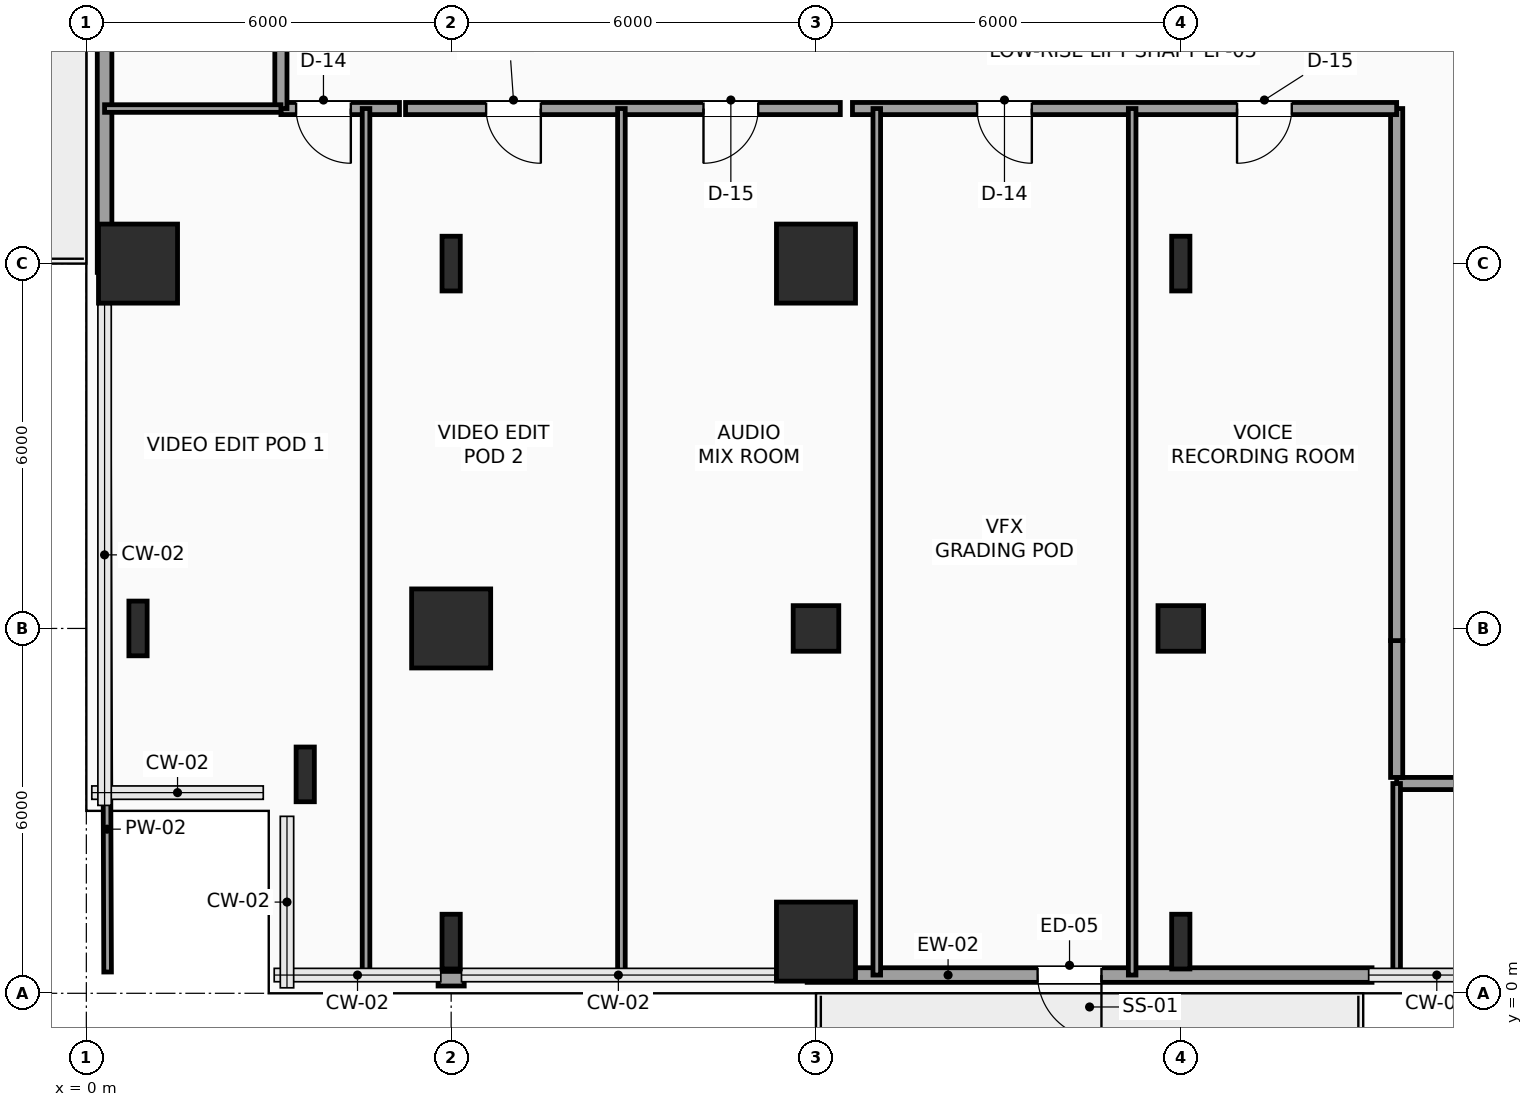
"""IFC4 building model, lengths in metres.
Left out: names, types, materials, properties, quantities, classifications, styles, units other than length and angle.
Written with IfcOpenShell. Run it as: python <this file> out.ifc"""

import sys

from ifc_helpers import new_model, si_unit, direction, frame, frame_2d, origin, origin_2d, place, context, subcontext, project, spatial, rectangle, hollow_rectangle, i_section, extrude, element, fill, save


model = new_model("IFC4")
c1 = context("Model", 3, precision=1e-05, world=origin(), true_north=direction((0.0, 1.0)))
c2 = subcontext(c1, "Body", "Model", "MODEL_VIEW")
j1 = project(units=[si_unit("LENGTHUNIT", "METRE"), si_unit("PLANEANGLEUNIT", "RADIAN")], contexts=[c1])
p1 = place(None, origin())
s1 = spatial("IfcSite", under=j1, at=p1, CompositionType="ELEMENT")
p2 = place(p1, origin())
s2 = spatial("IfcBuilding", under=s1, at=p2, CompositionType="ELEMENT")
p3 = place(p2, frame((0.0, 0.0, 51.9)))
s3 = spatial("IfcBuildingStorey", under=s2, at=p3, CompositionType="ELEMENT", Elevation=51.9)
for number, where, z_axis, x_axis in (
    (1, (3.6, 3.6, 0.0), (0.0, 0.0, 1.0), (1.0, 0.0, 0.0)),
    (2, (0.85, 6.0, 0.0), (0.0, 0.0, 1.0), (1.0, 0.0, 0.0)),
):
    element("IfcColumn", number, at=place(p3, frame(where, z_axis=z_axis, x_axis=x_axis)), inside=s3, PredefinedType="COLUMN", context=c2, shape_type="SweptSolid", body=[
        extrude(i_section(OverallWidth=0.3, OverallDepth=0.9, WebThickness=0.019, FlangeThickness=0.035, FilletRadius=0.03, at=origin_2d()), origin(), (0.0, 0.0, 1.0), 3.9),
    ])
p4 = place(p3, frame((0.85, 12.0, 0.0), z_axis=(0.0, 0.0, 1.0), x_axis=(1.0, 0.0, 0.0)))
e3 = element("IfcColumn", 3, at=p4, inside=s3, PredefinedType="COLUMN", context=c2, shape_type="SweptSolid", body=[
    extrude(rectangle(XDim=1.3, YDim=1.3, at=origin_2d()), origin(), (0.0, 0.0, 1.0), 3.9),
])
p5 = place(p3, frame((6.0, 0.85, 0.0), z_axis=(0.0, 0.0, 1.0), x_axis=(1.0, 0.0, 0.0)))
e4 = element("IfcColumn", 4, at=p5, inside=s3, PredefinedType="COLUMN", context=c2, shape_type="SweptSolid", body=[
    extrude(i_section(OverallWidth=0.3, OverallDepth=0.9, WebThickness=0.019, FlangeThickness=0.035, FilletRadius=0.03, at=origin_2d()), origin(), (0.0, 0.0, 1.0), 3.9),
])
p6 = place(p3, frame((6.0, 6.0, 0.0), z_axis=(0.0, 0.0, 1.0), x_axis=(1.0, 0.0, 0.0)))
e5 = element("IfcColumn", 5, at=p6, inside=s3, PredefinedType="COLUMN", context=c2, shape_type="SweptSolid", body=[
    extrude(rectangle(XDim=1.3, YDim=1.3, at=origin_2d()), origin(), (0.0, 0.0, 1.0), 3.9),
])
p7 = place(p3, frame((6.0, 12.0, 0.0), z_axis=(0.0, 0.0, 1.0), x_axis=(1.0, 0.0, 0.0)))
e6 = element("IfcColumn", 6, at=p7, inside=s3, PredefinedType="COLUMN", context=c2, shape_type="SweptSolid", body=[
    extrude(i_section(OverallWidth=0.3, OverallDepth=0.9, WebThickness=0.019, FlangeThickness=0.035, FilletRadius=0.03, at=origin_2d()), origin(), (0.0, 0.0, 1.0), 3.9),
])
p8 = place(p3, frame((12.0, 0.85, 0.0), z_axis=(0.0, 0.0, 1.0), x_axis=(1.0, 0.0, 0.0)))
e7 = element("IfcColumn", 7, at=p8, inside=s3, PredefinedType="COLUMN", context=c2, shape_type="SweptSolid", body=[
    extrude(rectangle(XDim=1.3, YDim=1.3, at=origin_2d()), origin(), (0.0, 0.0, 1.0), 3.9),
])
p9 = place(p3, frame((12.0, 6.0, 0.0), z_axis=(0.0, 0.0, 1.0), x_axis=(1.0, 0.0, 0.0)))
e8 = element("IfcColumn", 8, at=p9, inside=s3, PredefinedType="COLUMN", context=c2, shape_type="SweptSolid", body=[
    extrude(hollow_rectangle(XDim=0.75, YDim=0.75, WallThickness=0.035, InnerFilletRadius=0.035, OuterFilletRadius=0.05, at=origin_2d()), origin(), (0.0, 0.0, 1.0), 3.9),
])
p10 = place(p3, frame((12.0, 12.0, 0.0), z_axis=(0.0, 0.0, 1.0), x_axis=(1.0, 0.0, 0.0)))
e9 = element("IfcColumn", 9, at=p10, inside=s3, PredefinedType="COLUMN", context=c2, shape_type="SweptSolid", body=[
    extrude(rectangle(XDim=1.3, YDim=1.3, at=origin_2d()), origin(), (0.0, 0.0, 1.0), 3.9),
])
p11 = place(p3, frame((18.0, 0.85, 0.0), z_axis=(0.0, 0.0, 1.0), x_axis=(1.0, 0.0, 0.0)))
e10 = element("IfcColumn", 10, at=p11, inside=s3, PredefinedType="COLUMN", context=c2, shape_type="SweptSolid", body=[
    extrude(i_section(OverallWidth=0.3, OverallDepth=0.9, WebThickness=0.019, FlangeThickness=0.035, FilletRadius=0.03, at=origin_2d()), origin(), (0.0, 0.0, 1.0), 3.9),
])
p12 = place(p3, frame((18.0, 6.0, 0.0), z_axis=(0.0, 0.0, 1.0), x_axis=(1.0, 0.0, 0.0)))
e11 = element("IfcColumn", 11, at=p12, inside=s3, PredefinedType="COLUMN", context=c2, shape_type="SweptSolid", body=[
    extrude(hollow_rectangle(XDim=0.75, YDim=0.75, WallThickness=0.035, InnerFilletRadius=0.035, OuterFilletRadius=0.05, at=origin_2d()), origin(), (0.0, 0.0, 1.0), 3.9),
])
p13 = place(p3, frame((18.0, 12.0, 0.0), z_axis=(0.0, 0.0, 1.0), x_axis=(1.0, 0.0, 0.0)))
e12 = element("IfcColumn", 12, at=p13, inside=s3, PredefinedType="COLUMN", context=c2, shape_type="SweptSolid", body=[
    extrude(i_section(OverallWidth=0.3, OverallDepth=0.9, WebThickness=0.019, FlangeThickness=0.035, FilletRadius=0.03, at=origin_2d()), origin(), (0.0, 0.0, 1.0), 3.9),
])
p14 = place(p3, frame((21.145, 0.3, 0.0), z_axis=(0.0, 0.0, 1.0), x_axis=(-1.0, 0.0, 0.0)))
e13 = element("IfcWall", 13, at=p14, inside=s3, PredefinedType="SOLIDWALL", context=c2, shape_type="SweptSolid", body=[
    extrude(rectangle(XDim=9.29, YDim=0.24, at=frame_2d((4.645, 0.0))), origin(), (0.0, 0.0, 1.0), 3.65),
])
p15 = place(p14, frame((4.45, 0.0, 0.0)))
e14 = element("IfcOpeningElement", 14, at=p15, cuts=e13, PredefinedType="OPENING", context=c2, shape_type="SweptSolid", body=[
    extrude(rectangle(XDim=1.05, YDim=2.2, at=frame_2d((0.525, 1.1))), frame((0.0, 0.13, 0.0), z_axis=(0.0, -1.0, 0.0), x_axis=(1.0, 0.0, 0.0)), (0.0, 0.0, 1.0), 0.26),
])
p16 = place(p3, frame((0.3, 11.855, 0.0), z_axis=(0.0, 0.0, 1.0), x_axis=(0.0, 1.0, 0.0)))
e15 = element("IfcWall", 15, at=p16, inside=s3, PredefinedType="SOLIDWALL", context=c2, shape_type="SweptSolid", body=[
    extrude(rectangle(XDim=9.29, YDim=0.24, at=frame_2d((4.645, 0.0))), origin(), (0.0, 0.0, 1.0), 3.65),
])
p17 = place(p16, frame((3.945, 0.0, 0.0)))
e16 = element("IfcOpeningElement", 16, at=p17, cuts=e15, PredefinedType="OPENING", context=c2, shape_type="SweptSolid", body=[
    extrude(rectangle(XDim=1.05, YDim=2.2, at=frame_2d((0.525, 1.1))), frame((0.0, 0.13, 0.0), z_axis=(0.0, -1.0, 0.0), x_axis=(1.0, 0.0, 0.0)), (0.0, 0.0, 1.0), 0.26),
])
p18 = place(p3, frame((6.215, 0.24, 0.0), z_axis=(0.0, 0.0, 1.0), x_axis=(-1.0, 0.0, 0.0)))
e17 = element("IfcWall", 17, at=p18, inside=s3, PredefinedType="SOLIDWALL", context=c2, shape_type="SweptSolid", body=[
    extrude(rectangle(XDim=0.43, YDim=0.24, at=frame_2d((0.215, 0.0))), origin(), (0.0, 0.0, 1.0), 3.65),
])
p19 = place(p3, frame((36.15, 3.45, 0.0), z_axis=(0.0, 0.0, 1.0), x_axis=(-1.0, 0.0, 0.0)))
e18 = element("IfcWall", 18, at=p19, inside=s3, PredefinedType="PARTITIONING", context=c2, shape_type="SweptSolid", body=[
    extrude(rectangle(XDim=14.6, YDim=0.2, at=frame_2d((7.3, 0.0))), origin(), (0.0, 0.0, 1.0), 3.142),
])
p20 = place(p19, frame((11.325, 0.0, 0.0)))
e19 = element("IfcOpeningElement", 19, at=p20, cuts=e18, PredefinedType="OPENING", context=c2, shape_type="SweptSolid", body=[
    extrude(rectangle(XDim=0.9, YDim=2.1, at=frame_2d((0.45, 1.05))), frame((0.0, 0.11, 0.0), z_axis=(0.0, -1.0, 0.0), x_axis=(1.0, 0.0, 0.0)), (0.0, 0.0, 1.0), 0.22),
])
p21 = place(p19, frame((5.7, 0.0, 0.0)))
e20 = element("IfcOpeningElement", 20, at=p21, cuts=e18, PredefinedType="OPENING", context=c2, shape_type="SweptSolid", body=[
    extrude(rectangle(XDim=0.9, YDim=2.1, at=frame_2d((0.45, 1.05))), frame((0.0, 0.11, 0.0), z_axis=(0.0, -1.0, 0.0), x_axis=(1.0, 0.0, 0.0)), (0.0, 0.0, 1.0), 0.22),
])
p22 = place(p3, frame((21.55, 3.55, 0.0), z_axis=(0.0, 0.0, 1.0), x_axis=(0.0, 1.0, 0.0)))
e21 = element("IfcWall", 21, at=p22, inside=s3, PredefinedType="PARTITIONING", context=c2, shape_type="SweptSolid", body=[
    extrude(rectangle(XDim=2.25, YDim=0.2, at=frame_2d((1.125, 0.0))), origin(), (0.0, 0.0, 1.0), 3.65),
])
p23 = place(p3, frame((21.55, 5.8, 0.0), z_axis=(0.0, 0.0, 1.0), x_axis=(0.0, 1.0, 0.0)))
e22 = element("IfcWall", 22, at=p23, inside=s3, PredefinedType="PARTITIONING", context=c2, shape_type="SweptSolid", body=[
    extrude(rectangle(XDim=8.75, YDim=0.2, at=frame_2d((4.375, 0.0))), origin(), (0.0, 0.0, 1.0), 3.65),
])
p24 = place(p3, frame((21.55, 14.55, 0.0), z_axis=(0.0, 0.0, 1.0), x_axis=(-1.0, 0.0, 0.0)))
e23 = element("IfcWall", 23, at=p24, inside=s3, PredefinedType="PARTITIONING", context=c2, shape_type="SweptSolid", body=[
    extrude(rectangle(XDim=8.95, YDim=0.2, at=frame_2d((4.475, 0.0))), origin(), (0.0, 0.0, 1.0), 3.65),
])
p25 = place(p24, frame((6.0, 0.0, 0.0)))
e24 = element("IfcOpeningElement", 24, at=p25, cuts=e23, PredefinedType="OPENING", context=c2, shape_type="SweptSolid", body=[
    extrude(rectangle(XDim=0.9, YDim=2.1, at=frame_2d((0.45, 1.05))), frame((0.0, 0.11, 0.0), z_axis=(0.0, -1.0, 0.0), x_axis=(1.0, 0.0, 0.0)), (0.0, 0.0, 1.0), 0.22),
])
p26 = place(p24, frame((1.725, 0.0, 0.0)))
e25 = element("IfcOpeningElement", 25, at=p26, cuts=e23, PredefinedType="OPENING", context=c2, shape_type="SweptSolid", body=[
    extrude(rectangle(XDim=0.9, YDim=2.1, at=frame_2d((0.45, 1.05))), frame((0.0, 0.11, 0.0), z_axis=(0.0, -1.0, 0.0), x_axis=(1.0, 0.0, 0.0)), (0.0, 0.0, 1.0), 0.22),
])
p27 = place(p3, frame((12.4, 14.55, 0.0), z_axis=(0.0, 0.0, 1.0), x_axis=(-1.0, 0.0, 0.0)))
e26 = element("IfcWall", 26, at=p27, inside=s3, PredefinedType="PARTITIONING", context=c2, shape_type="SweptSolid", body=[
    extrude(rectangle(XDim=7.15, YDim=0.2, at=frame_2d((3.575, 0.0))), origin(), (0.0, 0.0, 1.0), 3.65),
])
p28 = place(p27, frame((4.925, 0.0, 0.0)))
e27 = element("IfcOpeningElement", 27, at=p28, cuts=e26, PredefinedType="OPENING", context=c2, shape_type="SweptSolid", body=[
    extrude(rectangle(XDim=0.9, YDim=2.1, at=frame_2d((0.45, 1.05))), frame((0.0, 0.11, 0.0), z_axis=(0.0, -1.0, 0.0), x_axis=(1.0, 0.0, 0.0)), (0.0, 0.0, 1.0), 0.22),
])
p29 = place(p27, frame((1.35, 0.0, 0.0)))
e28 = element("IfcOpeningElement", 28, at=p29, cuts=e26, PredefinedType="OPENING", context=c2, shape_type="SweptSolid", body=[
    extrude(rectangle(XDim=0.9, YDim=2.1, at=frame_2d((0.45, 1.05))), frame((0.0, 0.11, 0.0), z_axis=(0.0, -1.0, 0.0), x_axis=(1.0, 0.0, 0.0)), (0.0, 0.0, 1.0), 0.22),
])
p30 = place(p3, frame((5.15, 14.55, 0.0), z_axis=(0.0, 0.0, 1.0), x_axis=(-1.0, 0.0, 0.0)))
e29 = element("IfcWall", 29, at=p30, inside=s3, PredefinedType="PARTITIONING", context=c2, shape_type="SweptSolid", body=[
    extrude(rectangle(XDim=1.95, YDim=0.2, at=frame_2d((0.975, 0.0))), origin(), (0.0, 0.0, 1.0), 3.65),
])
p31 = place(p30, frame((0.8, 0.0, 0.0)))
e30 = element("IfcOpeningElement", 30, at=p31, cuts=e29, PredefinedType="OPENING", context=c2, shape_type="SweptSolid", body=[
    extrude(rectangle(XDim=0.9, YDim=2.1, at=frame_2d((0.45, 1.05))), frame((0.0, 0.11, 0.0), z_axis=(0.0, -1.0, 0.0), x_axis=(1.0, 0.0, 0.0)), (0.0, 0.0, 1.0), 0.22),
])
p32 = place(p3, frame((3.2, 14.55, 0.0), z_axis=(0.0, 0.0, 1.0), x_axis=(0.0, 1.0, 0.0)))
e31 = element("IfcWall", 31, at=p32, inside=s3, PredefinedType="PARTITIONING", context=c2, shape_type="SweptSolid", body=[
    extrude(rectangle(XDim=15.7, YDim=0.2, at=frame_2d((7.85, 0.0))), origin(), (0.0, 0.0, 1.0), 3.65),
])
p33 = place(p32, frame((2.65, 0.0, 0.0)))
e32 = element("IfcOpeningElement", 32, at=p33, cuts=e31, PredefinedType="OPENING", context=c2, shape_type="SweptSolid", body=[
    extrude(rectangle(XDim=0.9, YDim=2.1, at=frame_2d((0.45, 1.05))), frame((0.0, 0.11, 0.0), z_axis=(0.0, -1.0, 0.0), x_axis=(1.0, 0.0, 0.0)), (0.0, 0.0, 1.0), 0.22),
])
p34 = place(p32, frame((8.85, 0.0, 0.0)))
e33 = element("IfcOpeningElement", 33, at=p34, cuts=e31, PredefinedType="OPENING", context=c2, shape_type="SweptSolid", body=[
    extrude(rectangle(XDim=0.9, YDim=2.1, at=frame_2d((0.45, 1.05))), frame((0.0, 0.11, 0.0), z_axis=(0.0, -1.0, 0.0), x_axis=(1.0, 0.0, 0.0)), (0.0, 0.0, 1.0), 0.22),
])
p35 = place(p32, frame((13.6, 0.0, 0.0)))
e34 = element("IfcOpeningElement", 34, at=p35, cuts=e31, PredefinedType="OPENING", context=c2, shape_type="SweptSolid", body=[
    extrude(rectangle(XDim=0.9, YDim=2.1, at=frame_2d((0.45, 1.05))), frame((0.0, 0.11, 0.0), z_axis=(0.0, -1.0, 0.0), x_axis=(1.0, 0.0, 0.0)), (0.0, 0.0, 1.0), 0.22),
])
p36 = place(p3, frame((0.35, 0.35, 0.0), z_axis=(0.0, 0.0, 1.0), x_axis=(-0.003522599314, 0.999993795628, 0.0)))
e35 = element("IfcWall", 35, at=p36, inside=s3, PredefinedType="PARTITIONING", context=c2, shape_type="SweptSolid", body=[
    extrude(rectangle(XDim=11.505, YDim=0.125, at=frame_2d((5.752, 0.0))), origin(), (0.0, 0.0, 1.0), 3.65),
])
for number, where, z_axis, x_axis in (
    (36, (4.6, 0.3, 0.0), (0.0, 0.0, 1.0), (0.0, 1.0, 0.0)),
    (37, (8.8, 0.3, 0.0), (0.0, 0.0, 1.0), (0.0, 1.0, 0.0)),
    (38, (13.0, 0.3, 0.0), (0.0, 0.0, 1.0), (0.0, 1.0, 0.0)),
    (39, (17.2, 0.3, 0.0), (0.0, 0.0, 1.0), (0.0, 1.0, 0.0)),
):
    element("IfcWall", number, at=place(p3, frame(where, z_axis=z_axis, x_axis=x_axis)), inside=s3, PredefinedType="PARTITIONING", context=c2, shape_type="SweptSolid", body=[
        extrude(rectangle(XDim=14.25, YDim=0.125, at=frame_2d((7.125, 0.0))), origin(), (0.0, 0.0, 1.0), 3.65),
    ])
p37 = place(p3, frame((0.3, 14.55, 0.0), z_axis=(0.0, 0.0, 1.0), x_axis=(1.0, 0.0, 0.0)))
e40 = element("IfcWall", 40, at=p37, inside=s3, PredefinedType="PARTITIONING", context=c2, shape_type="SweptSolid", body=[
    extrude(rectangle(XDim=2.9, YDim=0.125, at=frame_2d((1.45, 0.0))), origin(), (0.0, 0.0, 1.0), 3.65),
])
p38 = place(p3, frame((21.55, 0.3, 0.0), z_axis=(0.0, 0.0, 1.0), x_axis=(0.0, 1.0, 0.0)))
e41 = element("IfcWall", 41, at=p38, inside=s3, PredefinedType="PARTITIONING", context=c2, shape_type="SweptSolid", body=[
    extrude(rectangle(XDim=3.15, YDim=0.125, at=frame_2d((1.575, 0.0))), origin(), (0.0, 0.0, 1.0), 3.65),
])
p39 = place(p15, origin())
e42 = element("IfcDoor", 42, at=p39, inside=s3, OperationType="SINGLE_SWING_LEFT", PredefinedType="DOOR", context=c2, shape_type="SweptSolid", body=[
    extrude(rectangle(XDim=1.05, YDim=2.2, at=frame_2d((0.525, 1.1))), frame((0.0, 0.025, 0.0), z_axis=(0.0, -1.0, 0.0), x_axis=(1.0, 0.0, 0.0)), (0.0, 0.0, 1.0), 0.05),
])
fill(e14, e42)
p40 = place(p25, origin())
e43 = element("IfcDoor", 43, at=p40, inside=s3, OperationType="SINGLE_SWING_LEFT", PredefinedType="DOOR", context=c2, shape_type="SweptSolid", body=[
    extrude(rectangle(XDim=0.9, YDim=2.1, at=frame_2d((0.45, 1.05))), frame((0.0, 0.025, 0.0), z_axis=(0.0, -1.0, 0.0), x_axis=(1.0, 0.0, 0.0)), (0.0, 0.0, 1.0), 0.05),
])
fill(e24, e43)
p41 = place(p26, origin())
e44 = element("IfcDoor", 44, at=p41, inside=s3, OperationType="SINGLE_SWING_RIGHT", PredefinedType="DOOR", context=c2, shape_type="SweptSolid", body=[
    extrude(rectangle(XDim=0.9, YDim=2.1, at=frame_2d((0.45, 1.05))), frame((0.0, 0.025, 0.0), z_axis=(0.0, -1.0, 0.0), x_axis=(1.0, 0.0, 0.0)), (0.0, 0.0, 1.0), 0.05),
])
fill(e25, e44)
p42 = place(p28, origin())
e45 = element("IfcDoor", 45, at=p42, inside=s3, OperationType="SINGLE_SWING_LEFT", PredefinedType="DOOR", context=c2, shape_type="SweptSolid", body=[
    extrude(rectangle(XDim=0.9, YDim=2.1, at=frame_2d((0.45, 1.05))), frame((0.0, 0.025, 0.0), z_axis=(0.0, -1.0, 0.0), x_axis=(1.0, 0.0, 0.0)), (0.0, 0.0, 1.0), 0.05),
])
fill(e27, e45)
p43 = place(p29, origin())
e46 = element("IfcDoor", 46, at=p43, inside=s3, OperationType="SINGLE_SWING_RIGHT", PredefinedType="DOOR", context=c2, shape_type="SweptSolid", body=[
    extrude(rectangle(XDim=0.9, YDim=2.1, at=frame_2d((0.45, 1.05))), frame((0.0, 0.025, 0.0), z_axis=(0.0, -1.0, 0.0), x_axis=(1.0, 0.0, 0.0)), (0.0, 0.0, 1.0), 0.05),
])
fill(e28, e46)
p44 = place(p31, origin())
e47 = element("IfcDoor", 47, at=p44, inside=s3, OperationType="SINGLE_SWING_LEFT", PredefinedType="DOOR", context=c2, shape_type="SweptSolid", body=[
    extrude(rectangle(XDim=0.9, YDim=2.1, at=frame_2d((0.45, 1.05))), frame((0.0, 0.025, 0.0), z_axis=(0.0, -1.0, 0.0), x_axis=(1.0, 0.0, 0.0)), (0.0, 0.0, 1.0), 0.05),
])
fill(e30, e47)
save(model, sys.argv[1])
